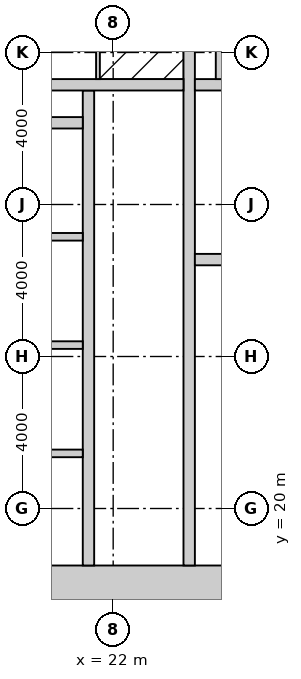
"""IFC4 building model, lengths in metres.
Left out: names, types, materials, properties, quantities, classifications, styles, units other than length and angle.
Written with IfcOpenShell. Run it as: python <this file> out.ifc"""

import sys

from ifc_helpers import new_model, si_unit, direction, frame, frame_2d, origin, place, context, subcontext, project, spatial, rectangle, extrude, element, fill, save


model = new_model("IFC4")
c1 = context("Model", 3, precision=1e-05, world=origin(), true_north=direction((0.0, 1.0)))
c2 = subcontext(c1, "Body", "Model", "MODEL_VIEW")
j1 = project(units=[si_unit("LENGTHUNIT", "METRE"), si_unit("PLANEANGLEUNIT", "RADIAN")], contexts=[c1])
p1 = place(None, origin())
s1 = spatial("IfcSite", under=j1, at=p1, CompositionType="ELEMENT")
p2 = place(p1, origin())
s2 = spatial("IfcBuilding", under=s1, at=p2, CompositionType="ELEMENT")
p3 = place(p2, frame((0.0, 0.0, 113.4)))
s3 = spatial("IfcBuildingStorey", under=s2, at=p3, CompositionType="ELEMENT", Elevation=113.4)
p4 = place(p3, frame((18.5, 18.0, -0.15), z_axis=(0.0, 0.0, 1.0), x_axis=(1.0, 0.0, 0.0)))
e1 = element("IfcWall", 1, at=p4, inside=s3, PredefinedType="SHEAR", context=c2, shape_type="SweptSolid", body=[
    extrude(rectangle(XDim=17.6, YDim=1.0, at=frame_2d((8.8, 0.0))), origin(), (0.0, 0.0, 1.0), 4.0),
])
p5 = place(p4, frame((3.45, 0.0, 0.15)))
e2 = element("IfcOpeningElement", 2, at=p5, cuts=e1, PredefinedType="OPENING", context=c2, shape_type="SweptSolid", body=[
    extrude(rectangle(XDim=1.5, YDim=2.4, at=frame_2d((0.75, 1.2))), frame((0.0, 0.51, 0.0), z_axis=(0.0, -1.0, 0.0), x_axis=(1.0, 0.0, 0.0)), (0.0, 0.0, 1.0), 1.02),
])
p6 = place(p3, frame((24.0, 18.5, -0.15), z_axis=(0.0, 0.0, 1.0), x_axis=(0.0, 1.0, 0.0)))
e3 = element("IfcWall", 3, at=p6, inside=s3, PredefinedType="SHEAR", context=c2, shape_type="SweptSolid", body=[
    extrude(rectangle(XDim=17.0, YDim=0.3, at=frame_2d((8.5, 0.0))), origin(), (0.0, 0.0, 1.0), 4.0),
])
p7 = place(p6, frame((9.6, 0.0, 0.15)))
e4 = element("IfcOpeningElement", 4, at=p7, cuts=e3, PredefinedType="OPENING", context=c2, shape_type="SweptSolid", body=[
    extrude(rectangle(XDim=1.5, YDim=2.4, at=frame_2d((0.75, 1.2))), frame((0.0, 0.16, 0.0), z_axis=(0.0, -1.0, 0.0), x_axis=(1.0, 0.0, 0.0)), (0.0, 0.0, 1.0), 0.32),
])
p8 = place(p3, frame((24.15, 26.55, -0.15), z_axis=(0.0, 0.0, 1.0), x_axis=(1.0, 0.0, 0.0)))
e5 = element("IfcWall", 5, at=p8, inside=s3, PredefinedType="SHEAR", context=c2, shape_type="SweptSolid", body=[
    extrude(rectangle(XDim=11.25, YDim=0.3, at=frame_2d((5.625, 0.0))), origin(), (0.0, 0.0, 1.0), 4.0),
])
p9 = place(p8, frame((9.25, 0.0, 0.15)))
e6 = element("IfcOpeningElement", 6, at=p9, cuts=e5, PredefinedType="OPENING", context=c2, shape_type="SweptSolid", body=[
    extrude(rectangle(XDim=1.0, YDim=2.2, at=frame_2d((0.5, 1.1))), frame((0.0, 0.16, 0.0), z_axis=(0.0, -1.0, 0.0), x_axis=(1.0, 0.0, 0.0)), (0.0, 0.0, 1.0), 0.32),
])
p10 = place(p8, frame((4.9, 0.0, 0.15)))
e7 = element("IfcOpeningElement", 7, at=p10, cuts=e5, PredefinedType="OPENING", context=c2, shape_type="SweptSolid", body=[
    extrude(rectangle(XDim=1.5, YDim=2.4, at=frame_2d((0.75, 1.2))), frame((0.0, 0.16, 0.0), z_axis=(0.0, -1.0, 0.0), x_axis=(1.0, 0.0, 0.0)), (0.0, 0.0, 1.0), 0.32),
])
p11 = place(p3, frame((24.15, 31.15, -0.15), z_axis=(0.0, 0.0, 1.0), x_axis=(1.0, 0.0, 0.0)))
e8 = element("IfcWall", 8, at=p11, inside=s3, PredefinedType="SHEAR", context=c2, shape_type="SweptSolid", body=[
    extrude(rectangle(XDim=11.25, YDim=0.3, at=frame_2d((5.625, 0.0))), origin(), (0.0, 0.0, 1.0), 4.0),
])
p12 = place(p11, frame((7.25, 0.0, 0.15)))
e9 = element("IfcOpeningElement", 9, at=p12, cuts=e8, PredefinedType="OPENING", context=c2, shape_type="SweptSolid", body=[
    extrude(rectangle(XDim=1.4, YDim=2.4, at=frame_2d((0.7, 1.2))), frame((0.0, 0.16, 0.0), z_axis=(0.0, -1.0, 0.0), x_axis=(1.0, 0.0, 0.0)), (0.0, 0.0, 1.0), 0.32),
])
p13 = place(p3, frame((21.35, 18.5, -0.15), z_axis=(0.0, 0.0, 1.0), x_axis=(0.0, 1.0, 0.0)))
e10 = element("IfcWall", 10, at=p13, inside=s3, PredefinedType="SHEAR", context=c2, shape_type="SweptSolid", body=[
    extrude(rectangle(XDim=12.5, YDim=0.3, at=frame_2d((6.25, 0.0))), origin(), (0.0, 0.0, 1.0), 4.0),
])
p14 = place(p13, frame((0.875, 0.0, 0.15)))
e11 = element("IfcOpeningElement", 11, at=p14, cuts=e10, PredefinedType="OPENING", context=c2, shape_type="SweptSolid", body=[
    extrude(rectangle(XDim=1.1, YDim=2.2, at=frame_2d((0.55, 1.1))), frame((0.0, 0.16, 0.0), z_axis=(0.0, -1.0, 0.0), x_axis=(1.0, 0.0, 0.0)), (0.0, 0.0, 1.0), 0.32),
])
p15 = place(p13, frame((3.825, 0.0, 0.15)))
e12 = element("IfcOpeningElement", 12, at=p15, cuts=e10, PredefinedType="OPENING", context=c2, shape_type="SweptSolid", body=[
    extrude(rectangle(XDim=1.1, YDim=2.2, at=frame_2d((0.55, 1.1))), frame((0.0, 0.16, 0.0), z_axis=(0.0, -1.0, 0.0), x_axis=(1.0, 0.0, 0.0)), (0.0, 0.0, 1.0), 0.32),
])
p16 = place(p13, frame((6.675, 0.0, 0.15)))
e13 = element("IfcOpeningElement", 13, at=p16, cuts=e10, PredefinedType="OPENING", context=c2, shape_type="SweptSolid", body=[
    extrude(rectangle(XDim=1.1, YDim=2.2, at=frame_2d((0.55, 1.1))), frame((0.0, 0.16, 0.0), z_axis=(0.0, -1.0, 0.0), x_axis=(1.0, 0.0, 0.0)), (0.0, 0.0, 1.0), 0.32),
])
p17 = place(p13, frame((9.575, 0.0, 0.15)))
e14 = element("IfcOpeningElement", 14, at=p17, cuts=e10, PredefinedType="OPENING", context=c2, shape_type="SweptSolid", body=[
    extrude(rectangle(XDim=1.1, YDim=2.2, at=frame_2d((0.55, 1.1))), frame((0.0, 0.16, 0.0), z_axis=(0.0, -1.0, 0.0), x_axis=(1.0, 0.0, 0.0)), (0.0, 0.0, 1.0), 0.32),
])
p18 = place(p3, frame((18.5, 31.15, -0.15), z_axis=(0.0, 0.0, 1.0), x_axis=(1.0, 0.0, 0.0)))
e15 = element("IfcWall", 15, at=p18, inside=s3, PredefinedType="SHEAR", context=c2, shape_type="SweptSolid", body=[
    extrude(rectangle(XDim=5.35, YDim=0.3, at=frame_2d((2.675, 0.0))), origin(), (0.0, 0.0, 1.0), 4.0),
])
p19 = place(p18, frame((3.4, 0.0, 0.15)))
e16 = element("IfcOpeningElement", 16, at=p19, cuts=e15, PredefinedType="OPENING", context=c2, shape_type="SweptSolid", body=[
    extrude(rectangle(XDim=1.0, YDim=2.2, at=frame_2d((0.5, 1.1))), frame((0.0, 0.16, 0.0), z_axis=(0.0, -1.0, 0.0), x_axis=(1.0, 0.0, 0.0)), (0.0, 0.0, 1.0), 0.32),
])
p20 = place(p3, frame((18.5, 30.15, -0.15), z_axis=(0.0, 0.0, 1.0), x_axis=(1.0, 0.0, 0.0)))
e17 = element("IfcWall", 17, at=p20, inside=s3, PredefinedType="SHEAR", context=c2, shape_type="SweptSolid", body=[
    extrude(rectangle(XDim=2.7, YDim=0.3, at=frame_2d((1.35, 0.0))), origin(), (0.0, 0.0, 1.0), 4.0),
])
p21 = place(p3, frame((24.85, 31.3, -0.15), z_axis=(0.0, 0.0, 1.0), x_axis=(0.0, 1.0, 0.0)))
e18 = element("IfcWall", 18, at=p21, inside=s3, PredefinedType="SHEAR", context=c2, shape_type="SweptSolid", body=[
    extrude(rectangle(XDim=4.2, YDim=0.3, at=frame_2d((2.1, 0.0))), origin(), (0.0, 0.0, 1.0), 4.0),
])
for number, where, z_axis, x_axis in (
    (19, (18.5, 21.45, -0.15), (0.0, 0.0, 1.0), (1.0, 0.0, 0.0)),
    (20, (18.5, 24.3, -0.15), (0.0, 0.0, 1.0), (1.0, 0.0, 0.0)),
    (21, (18.5, 27.15, -0.15), (0.0, 0.0, 1.0), (1.0, 0.0, 0.0)),
):
    element("IfcWall", number, at=place(p3, frame(where, z_axis=z_axis, x_axis=x_axis)), inside=s3, PredefinedType="SOLIDWALL", context=c2, shape_type="SweptSolid", body=[
        extrude(rectangle(XDim=2.7, YDim=0.2, at=frame_2d((1.35, 0.0))), origin(), (0.0, 0.0, 1.0), 4.0),
    ])
p22 = place(p3, frame((21.6, 31.3, 0.0), z_axis=(0.0, 0.0, 1.0), x_axis=(0.0, 1.0, 0.0)))
e22 = element("IfcWall", 22, at=p22, inside=s3, PredefinedType="PARTITIONING", context=c2, shape_type="SweptSolid", body=[
    extrude(rectangle(XDim=4.2, YDim=0.1, at=frame_2d((2.1, 0.0))), origin(), (0.0, 0.0, 1.0), 3.85),
])
p23 = place(p22, frame((1.55, 0.0, 0.0)))
e23 = element("IfcOpeningElement", 23, at=p23, cuts=e22, PredefinedType="OPENING", context=c2, shape_type="SweptSolid", body=[
    extrude(rectangle(XDim=1.0, YDim=2.2, at=frame_2d((0.5, 1.1))), frame((0.0, 0.06, 0.0), z_axis=(0.0, -1.0, 0.0), x_axis=(1.0, 0.0, 0.0)), (0.0, 0.0, 1.0), 0.12),
])
p24 = place(p7, origin())
e24 = element("IfcDoor", 24, at=p24, inside=s3, OperationType="DOUBLE_DOOR_DOUBLE_SWING", PredefinedType="DOOR", context=c2, shape_type="SweptSolid", body=[
    extrude(rectangle(XDim=1.5, YDim=2.4, at=frame_2d((0.75, 1.2))), frame((0.0, 0.025, 0.0), z_axis=(0.0, -1.0, 0.0), x_axis=(1.0, 0.0, 0.0)), (0.0, 0.0, 1.0), 0.05),
])
fill(e4, e24)
p25 = place(p19, origin())
e25 = element("IfcDoor", 25, at=p25, inside=s3, OperationType="SINGLE_SWING_LEFT", PredefinedType="DOOR", context=c2, shape_type="SweptSolid", body=[
    extrude(rectangle(XDim=1.0, YDim=2.2, at=frame_2d((0.5, 1.1))), frame((0.0, 0.025, 0.0), z_axis=(0.0, -1.0, 0.0), x_axis=(1.0, 0.0, 0.0)), (0.0, 0.0, 1.0), 0.05),
])
fill(e16, e25)
p26 = place(p5, origin())
e26 = element("IfcDoor", 26, at=p26, inside=s3, OperationType="DOUBLE_DOOR_DOUBLE_SWING", PredefinedType="DOOR", context=c2, shape_type="SweptSolid", body=[
    extrude(rectangle(XDim=1.5, YDim=2.4, at=frame_2d((0.75, 1.2))), frame((0.0, 0.025, 0.0), z_axis=(0.0, -1.0, 0.0), x_axis=(1.0, 0.0, 0.0)), (0.0, 0.0, 1.0), 0.05),
])
fill(e2, e26)
p27 = place(p14, origin())
e27 = element("IfcDoor", 27, at=p27, inside=s3, OperationType="DOUBLE_DOOR_SLIDING", PredefinedType="DOOR", context=c2, shape_type="SweptSolid", body=[
    extrude(rectangle(XDim=1.1, YDim=2.2, at=frame_2d((0.55, 1.1))), frame((0.0, 0.025, 0.0), z_axis=(0.0, -1.0, 0.0), x_axis=(1.0, 0.0, 0.0)), (0.0, 0.0, 1.0), 0.05),
])
fill(e11, e27)
p28 = place(p15, origin())
e28 = element("IfcDoor", 28, at=p28, inside=s3, OperationType="DOUBLE_DOOR_SLIDING", PredefinedType="DOOR", context=c2, shape_type="SweptSolid", body=[
    extrude(rectangle(XDim=1.1, YDim=2.2, at=frame_2d((0.55, 1.1))), frame((0.0, 0.025, 0.0), z_axis=(0.0, -1.0, 0.0), x_axis=(1.0, 0.0, 0.0)), (0.0, 0.0, 1.0), 0.05),
])
fill(e12, e28)
p29 = place(p16, origin())
e29 = element("IfcDoor", 29, at=p29, inside=s3, OperationType="DOUBLE_DOOR_SLIDING", PredefinedType="DOOR", context=c2, shape_type="SweptSolid", body=[
    extrude(rectangle(XDim=1.1, YDim=2.2, at=frame_2d((0.55, 1.1))), frame((0.0, 0.025, 0.0), z_axis=(0.0, -1.0, 0.0), x_axis=(1.0, 0.0, 0.0)), (0.0, 0.0, 1.0), 0.05),
])
fill(e13, e29)
p30 = place(p17, origin())
e30 = element("IfcDoor", 30, at=p30, inside=s3, OperationType="DOUBLE_DOOR_SLIDING", PredefinedType="DOOR", context=c2, shape_type="SweptSolid", body=[
    extrude(rectangle(XDim=1.1, YDim=2.2, at=frame_2d((0.55, 1.1))), frame((0.0, 0.025, 0.0), z_axis=(0.0, -1.0, 0.0), x_axis=(1.0, 0.0, 0.0)), (0.0, 0.0, 1.0), 0.05),
])
fill(e14, e30)
save(model, sys.argv[1])
